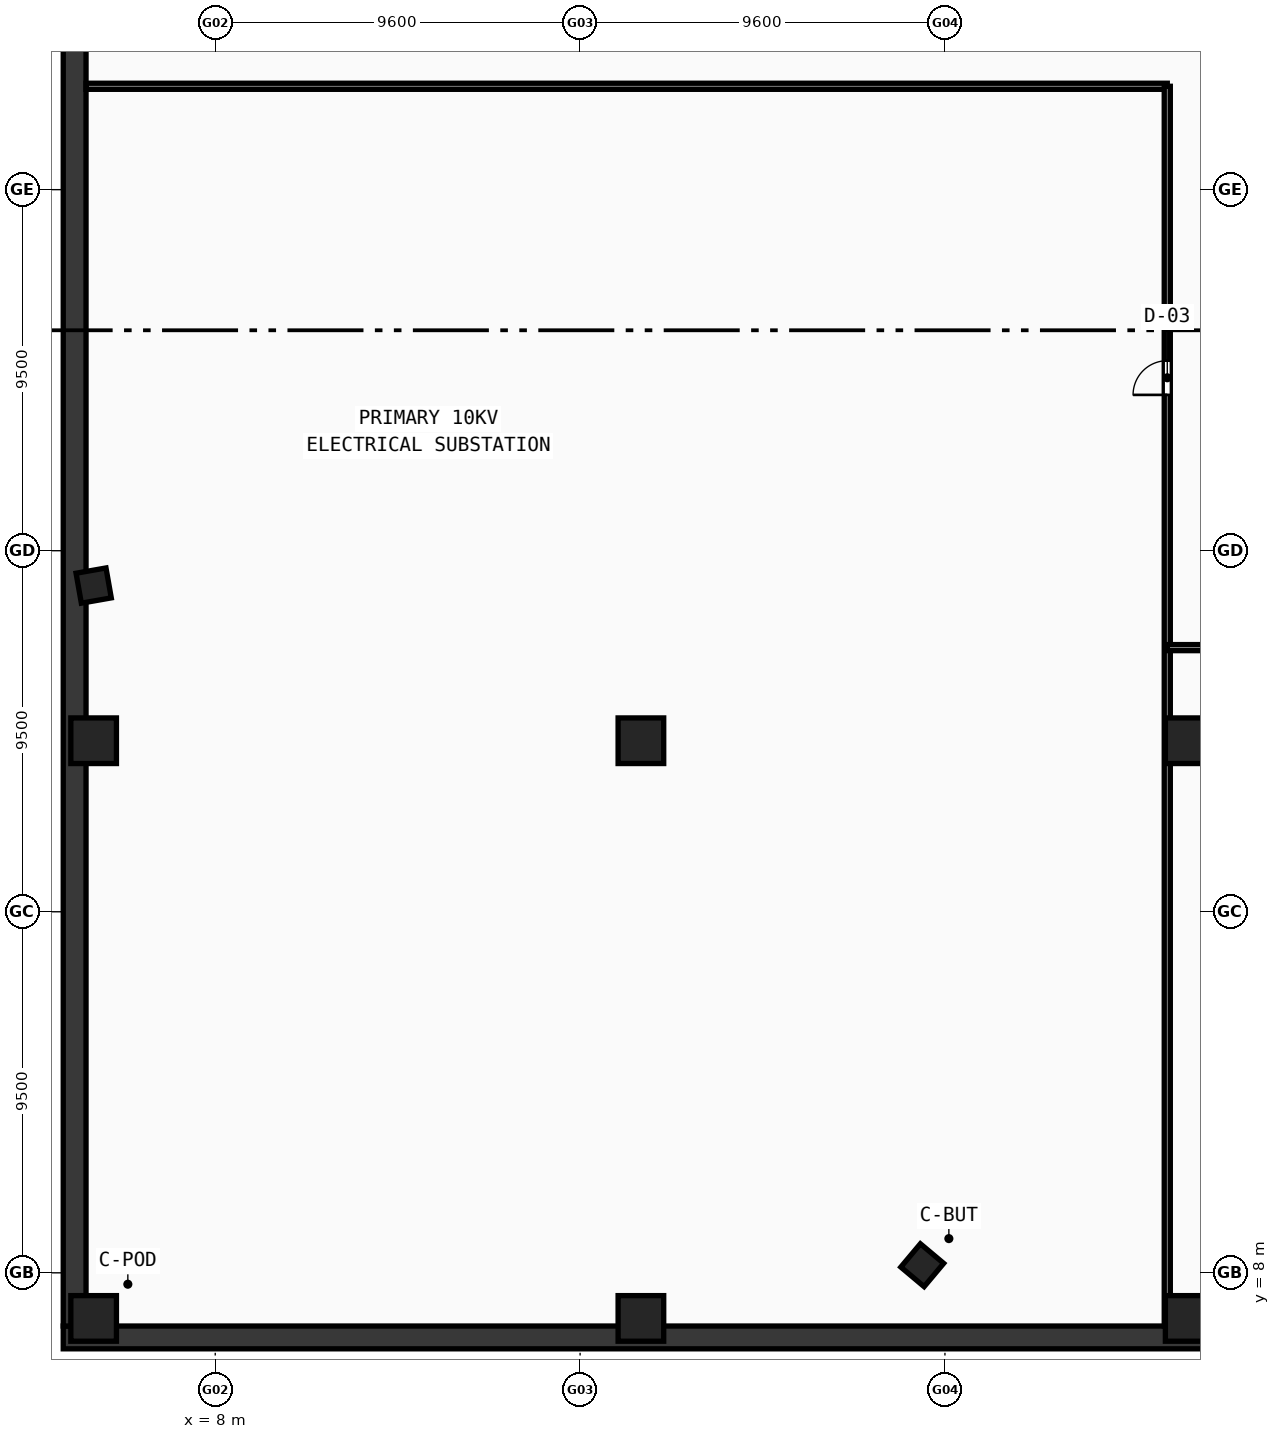
"""IFC4 building model, lengths in metres.
Left out: names, types, materials, properties, quantities, classifications, styles, units other than length and angle.
Written with IfcOpenShell. Run it as: python <this file> out.ifc"""

import sys

from ifc_helpers import new_model, si_unit, direction, frame, frame_2d, origin, origin_with_axes, origin_2d, place, context, subcontext, project, spatial, rectangle, hollow_rectangle, extrude, source, transform, mapped, element, fill, save


model = new_model("IFC4")
c1 = context("Model", 3, precision=1e-05, world=origin(), true_north=direction((0.0, 1.0)))
c2 = subcontext(c1, "Body", "Model", "MODEL_VIEW")
j1 = project(units=[si_unit("LENGTHUNIT", "METRE"), si_unit("PLANEANGLEUNIT", "RADIAN")], contexts=[c1])
p1 = place(None, origin())
s1 = spatial("IfcSite", under=j1, at=p1, CompositionType="ELEMENT")
p2 = place(p1, origin())
s2 = spatial("IfcBuilding", under=s1, at=p2, CompositionType="ELEMENT")
p3 = place(p2, frame((0.0, 0.0, -10.0)))
s3 = spatial("IfcBuildingStorey", under=s2, at=p3, CompositionType="ELEMENT", Elevation=-10.0)
p4 = place(p3, frame((4.0, 6.3, -0.6), z_axis=(0.0, 0.0, 1.0), x_axis=(1.0, 0.0, 0.0)))
e1 = element("IfcWall", 1, at=p4, inside=s3, PredefinedType="SHEAR", context=c2, shape_type="SweptSolid", body=[
    extrude(rectangle(XDim=88.0, YDim=0.6, at=frame_2d((44.0, 0.0))), origin(), (0.0, 0.0, 1.0), 5.5),
])
p5 = place(p3, frame((4.3, 6.6, -0.6), z_axis=(0.0, 0.0, 1.0), x_axis=(0.0, 1.0, 0.0)))
e2 = element("IfcWall", 2, at=p5, inside=s3, PredefinedType="SHEAR", context=c2, shape_type="SweptSolid", body=[
    extrude(rectangle(XDim=82.8, YDim=0.6, at=frame_2d((41.4, 0.0))), origin(), (0.0, 0.0, 1.0), 5.5),
])
m1 = source(origin(), c2, "Body", "SweptSolid", [
    extrude(hollow_rectangle(XDim=1.2, YDim=1.2, WallThickness=0.05, at=origin_2d()), origin(), (0.0, 0.0, 1.0), 5.5),
])
for number, where, z_axis, x_axis in (
    (3, (4.8, 6.8, -0.6), (0.0, 0.0, 1.0), (1.0, 0.0, 0.0)),
    (4, (4.8, 22.0, -0.6), (0.0, 0.0, 1.0), (1.0, 0.0, 0.0)),
    (5, (19.2, 6.8, -0.6), (0.0, 0.0, 1.0), (1.0, 0.0, 0.0)),
    (6, (19.2, 22.0, -0.6), (0.0, 0.0, 1.0), (1.0, 0.0, 0.0)),
    (7, (33.6, 6.8, -0.6), (0.0, 0.0, 1.0), (1.0, 0.0, 0.0)),
    (8, (33.6, 22.0, -0.6), (0.0, 0.0, 1.0), (1.0, 0.0, 0.0)),
):
    element("IfcColumn", number, at=place(p3, frame(where, z_axis=z_axis, x_axis=x_axis)), inside=s3, PredefinedType="COLUMN", context=c2, shape_type="MappedRepresentation", body=[
        mapped(m1, transform((0.0, 0.0, 0.0), scale=1.0)),
    ])
m2 = source(origin(), c2, "Body", "SweptSolid", [
    extrude(hollow_rectangle(XDim=0.8, YDim=0.8, WallThickness=0.032, at=origin_2d()), origin(), (0.0, 0.0, 1.0), 5.5),
])
for number, where, z_axis, x_axis in (
    (9, (26.603, 8.2, -0.6), (0.0, 0.0, 1.0), (0.766, -0.643, 0.0)),
    (10, (4.801, 26.083, -0.6), (0.0, 0.0, 1.0), (0.174, -0.985, 0.0)),
):
    element("IfcColumn", number, at=place(p3, frame(where, z_axis=z_axis, x_axis=x_axis)), inside=s3, PredefinedType="COLUMN", context=c2, shape_type="MappedRepresentation", body=[
        mapped(m2, transform((0.0, 0.0, 0.0), scale=1.0)),
    ])
p6 = place(p3, frame((4.6, 39.22, 0.0), z_axis=(0.0, 0.0, 1.0), x_axis=(1.0, 0.0, 0.0)))
e11 = element("IfcWall", 11, at=p6, inside=s3, PredefinedType="PARTITIONING", context=c2, shape_type="SweptSolid", body=[
    extrude(rectangle(XDim=28.45, YDim=0.16, at=frame_2d((14.225, 0.0))), origin(), (0.0, 0.0, 1.0), 4.0),
])
p7 = place(p3, frame((33.05, 6.6, 0.0), z_axis=(0.0, 0.0, 1.0), x_axis=(0.0, 1.0, 0.0)))
e12 = element("IfcWall", 12, at=p7, inside=s3, PredefinedType="PARTITIONING", context=c2, shape_type="SweptSolid", body=[
    extrude(rectangle(XDim=32.62, YDim=0.16, at=frame_2d((16.31, 0.0))), origin(), (0.0, 0.0, 1.0), 4.0),
])
p8 = place(p7, frame((24.5, 0.0, 0.0)))
e13 = element("IfcOpeningElement", 13, at=p8, cuts=e12, PredefinedType="OPENING", context=c2, shape_type="SweptSolid", body=[
    extrude(rectangle(XDim=0.9, YDim=2.1, at=frame_2d((0.45, 1.05))), frame((0.0, 0.09, 0.0), z_axis=(0.0, -1.0, 0.0), x_axis=(1.0, 0.0, 0.0)), (0.0, 0.0, 1.0), 0.18),
])
p9 = place(p3, frame((33.05, 24.45, 0.0), z_axis=(0.0, 0.0, 1.0), x_axis=(1.0, 0.0, 0.0)))
e14 = element("IfcWall", 14, at=p9, inside=s3, PredefinedType="PARTITIONING", context=c2, shape_type="SweptSolid", body=[
    extrude(rectangle(XDim=29.9, YDim=0.16, at=frame_2d((14.95, 0.0))), origin(), (0.0, 0.0, 1.0), 4.0),
])
p10 = place(p9, frame((10.0, 0.0, 0.0)))
e15 = element("IfcOpeningElement", 15, at=p10, cuts=e14, PredefinedType="OPENING", context=c2, shape_type="SweptSolid", body=[
    extrude(rectangle(XDim=0.9, YDim=2.1, at=frame_2d((0.45, 1.05))), frame((0.0, 0.09, 0.0), z_axis=(0.0, -1.0, 0.0), x_axis=(1.0, 0.0, 0.0)), (0.0, 0.0, 1.0), 0.18),
])
p11 = place(p9, frame((24.8, 0.0, 0.0)))
e16 = element("IfcOpeningElement", 16, at=p11, cuts=e14, PredefinedType="OPENING", context=c2, shape_type="SweptSolid", body=[
    extrude(rectangle(XDim=0.94, YDim=2.1, at=frame_2d((0.47, 1.05))), frame((0.0, 0.09, 0.0), z_axis=(0.0, -1.0, 0.0), x_axis=(1.0, 0.0, 0.0)), (0.0, 0.0, 1.0), 0.18),
])
p12 = place(p9, frame((28.1, 0.0, 0.0)))
e17 = element("IfcOpeningElement", 17, at=p12, cuts=e14, PredefinedType="OPENING", context=c2, shape_type="SweptSolid", body=[
    extrude(rectangle(XDim=0.9, YDim=2.1, at=frame_2d((0.45, 1.05))), frame((0.0, 0.09, 0.0), z_axis=(0.0, -1.0, 0.0), x_axis=(1.0, 0.0, 0.0)), (0.0, 0.0, 1.0), 0.18),
])
m3 = source(origin(), c2, "Body", "SweptSolid", [
    extrude(rectangle(XDim=0.9, YDim=2.1, at=frame_2d((0.45, 1.05))), frame((0.0, 0.025, 0.0), z_axis=(0.0, -1.0, 0.0), x_axis=(1.0, 0.0, 0.0)), (0.0, 0.0, 1.0), 0.05),
])
p13 = place(p8, origin_with_axes())
e18 = element("IfcDoor", 18, at=p13, inside=s3, OperationType="SINGLE_SWING_LEFT", PredefinedType="DOOR", context=c2, shape_type="MappedRepresentation", body=[
    mapped(m3, transform((0.0, 0.0, 0.0), scale=1.0)),
])
fill(e13, e18)
save(model, sys.argv[1])
